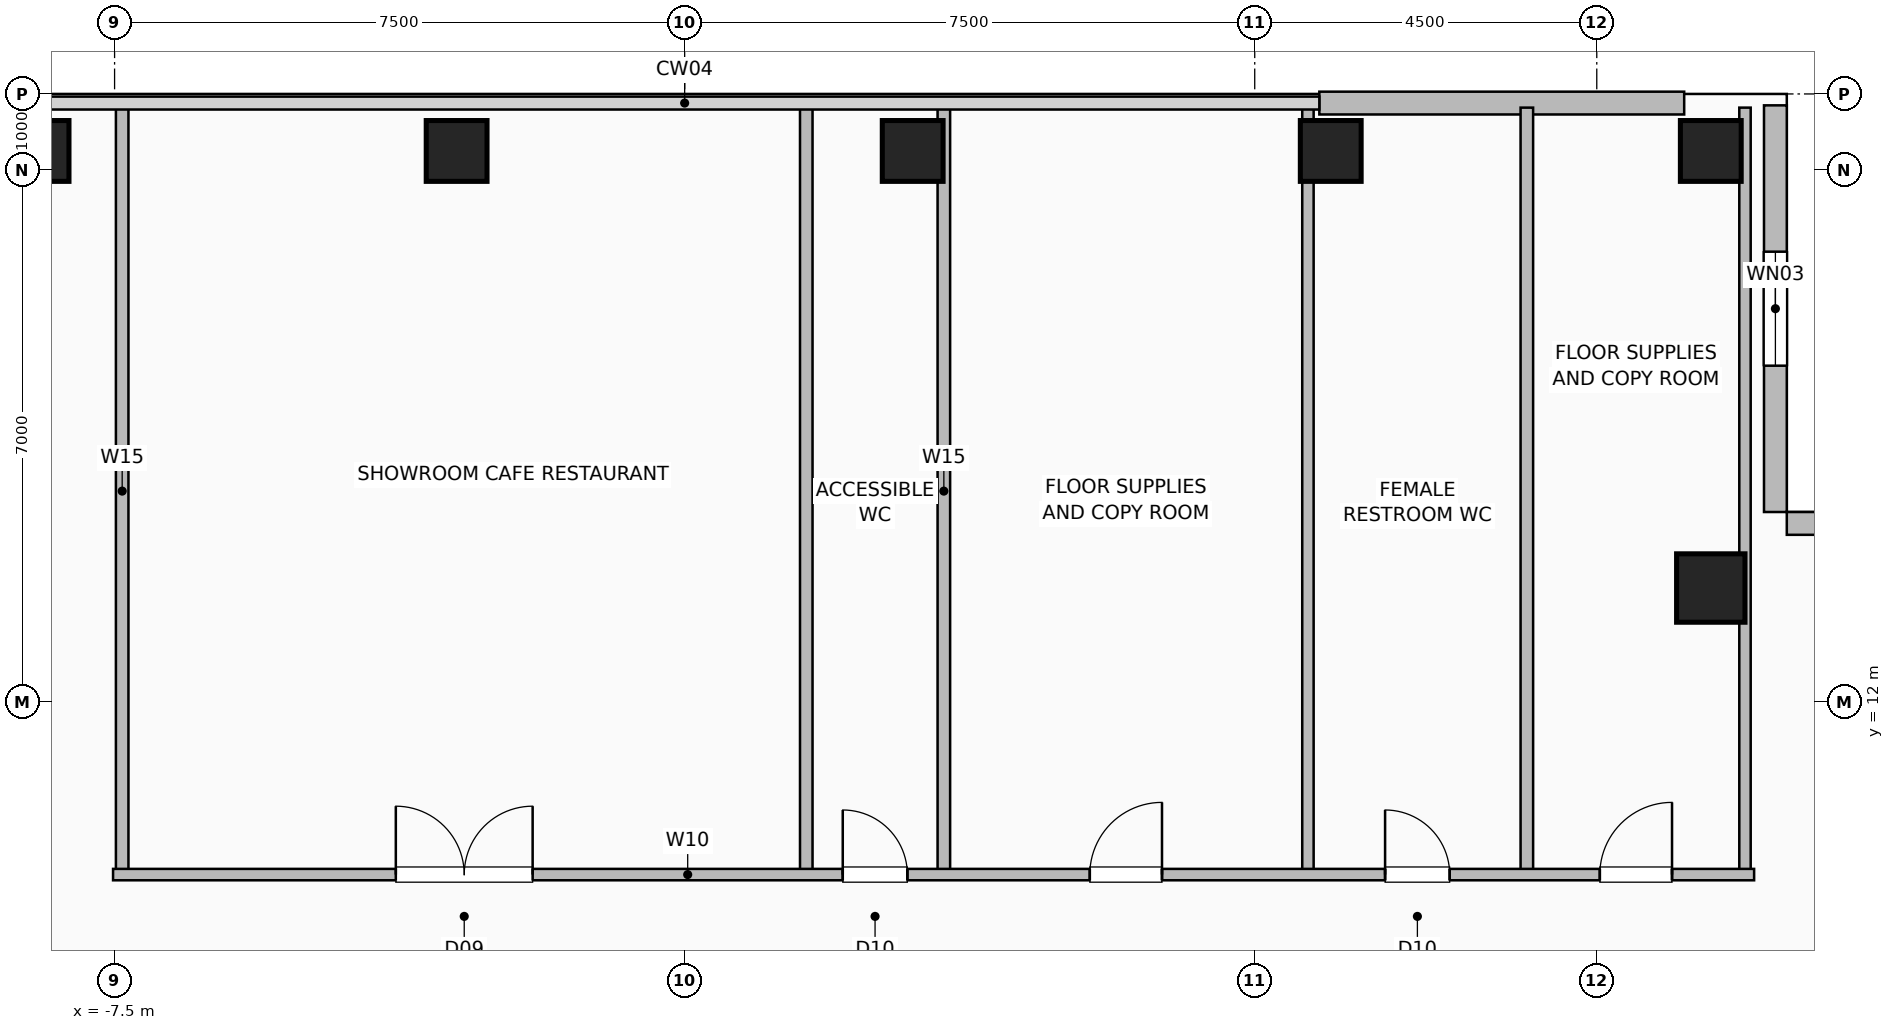
"""IFC4 building model, lengths in metres.
Left out: names, types, materials, properties, quantities, classifications, styles, units other than length and angle.
Written with IfcOpenShell. Run it as: python <this file> out.ifc"""

import sys

from ifc_helpers import new_model, si_unit, direction, frame, frame_2d, origin, origin_2d, place, context, subcontext, project, spatial, rectangle, hollow_rectangle, extrude, element, fill, save


model = new_model("IFC4")
c1 = context("Model", 3, precision=1e-05, world=origin(), true_north=direction((0.0, 1.0)))
c2 = subcontext(c1, "Body", "Model", "MODEL_VIEW")
j1 = project(units=[si_unit("LENGTHUNIT", "METRE"), si_unit("PLANEANGLEUNIT", "RADIAN")], contexts=[c1])
p1 = place(None, origin())
s1 = spatial("IfcSite", under=j1, at=p1, CompositionType="ELEMENT")
p2 = place(p1, origin())
s2 = spatial("IfcBuilding", under=s1, at=p2, CompositionType="ELEMENT")
p3 = place(p2, frame((0.0, 0.0, 223.8)))
s3 = spatial("IfcBuildingStorey", under=s2, at=p3, CompositionType="ELEMENT", Elevation=223.8)
for number, where, z_axis, x_axis in (
    (1, (-8.5, 19.25, 0.0), (0.0, 0.0, 1.0), (1.0, 0.0, 0.0)),
    (2, (-3.0, 19.25, 0.0), (0.0, 0.0, 1.0), (1.0, 0.0, 0.0)),
    (3, (3.0, 19.25, 0.0), (0.0, 0.0, 1.0), (1.0, 0.0, 0.0)),
    (4, (8.5, 19.25, 0.0), (0.0, 0.0, 1.0), (1.0, 0.0, 0.0)),
    (5, (13.5, 19.25, 0.0), (0.0, 0.0, 1.0), (1.0, 0.0, 0.0)),
):
    element("IfcColumn", number, at=place(p3, frame(where, z_axis=z_axis, x_axis=x_axis)), inside=s3, PredefinedType="COLUMN", context=c2, shape_type="SweptSolid", body=[
        extrude(hollow_rectangle(XDim=0.8, YDim=0.8, WallThickness=0.04, at=origin_2d()), origin(), (0.0, 0.0, 1.0), 3.6),
    ])
p4 = place(p3, frame((13.5, 13.5, 0.0), z_axis=(0.0, 0.0, 1.0), x_axis=(1.0, 0.0, 0.0)))
e6 = element("IfcColumn", 6, at=p4, inside=s3, PredefinedType="COLUMN", context=c2, shape_type="SweptSolid", body=[
    extrude(hollow_rectangle(XDim=0.9, YDim=0.9, WallThickness=0.045, at=origin_2d()), origin(), (0.0, 0.0, 1.0), 3.6),
])
p5 = place(p3, frame((8.35, 19.88, 0.0), z_axis=(0.0, 0.0, 1.0), x_axis=(1.0, 0.0, 0.0)))
e7 = element("IfcWall", 7, at=p5, inside=s3, PredefinedType="SOLIDWALL", context=c2, shape_type="SweptSolid", body=[
    extrude(rectangle(XDim=4.8, YDim=0.3, at=frame_2d((2.4, 0.0))), origin(), (0.0, 0.0, 1.0), 3.25),
])
p6 = place(p3, frame((14.35, 19.85, 0.0), z_axis=(0.0, 0.0, 1.0), x_axis=(0.0, -1.0, 0.0)))
e8 = element("IfcWall", 8, at=p6, inside=s3, PredefinedType="SOLIDWALL", context=c2, shape_type="SweptSolid", body=[
    extrude(rectangle(XDim=5.35, YDim=0.3, at=frame_2d((2.675, 0.0))), origin(), (0.0, 0.0, 1.0), 3.25),
])
p7 = place(p6, frame((1.925, 0.0, 0.9)))
e9 = element("IfcOpeningElement", 9, at=p7, cuts=e8, PredefinedType="OPENING", context=c2, shape_type="SweptSolid", body=[
    extrude(rectangle(XDim=1.5, YDim=1.8, at=frame_2d((0.75, 0.9))), frame((0.0, 0.16, 0.0), z_axis=(0.0, -1.0, 0.0), x_axis=(1.0, 0.0, 0.0)), (0.0, 0.0, 1.0), 0.32),
])
p8 = place(p3, frame((19.85, 14.35, 0.0), z_axis=(0.0, 0.0, 1.0), x_axis=(-1.0, 0.0, 0.0)))
e10 = element("IfcWall", 10, at=p8, inside=s3, PredefinedType="SOLIDWALL", context=c2, shape_type="SweptSolid", body=[
    extrude(rectangle(XDim=5.35, YDim=0.3, at=frame_2d((2.675, 0.0))), origin(), (0.0, 0.0, 1.0), 3.25),
])
for number, where, z_axis, x_axis in (
    (11, (3.41, 9.73, 0.0), (0.0, 0.0, 1.0), (0.0, 1.0, 0.0)),
    (12, (11.08, 9.73, 0.0), (0.0, 0.0, 1.0), (0.0, 1.0, 0.0)),
    (13, (-7.4, 9.73, 0.0), (0.0, 0.0, 1.0), (0.0, 1.0, 0.0)),
    (14, (1.6, 9.73, 0.0), (0.0, 0.0, 1.0), (0.0, 1.0, 0.0)),
):
    element("IfcWall", number, at=place(p3, frame(where, z_axis=z_axis, x_axis=x_axis)), inside=s3, PredefinedType="PLUMBINGWALL", context=c2, shape_type="SweptSolid", body=[
        extrude(rectangle(XDim=10.09, YDim=0.165, at=frame_2d((5.045, 0.0))), origin(), (0.0, 0.0, 1.0), 3.25),
    ])
for number, where, z_axis, x_axis in (
    (15, (8.2, 9.73, 0.0), (0.0, 0.0, 1.0), (0.0, 1.0, 0.0)),
    (16, (13.95, 9.73, 0.0), (0.0, 0.0, 1.0), (0.0, 1.0, 0.0)),
):
    element("IfcWall", number, at=place(p3, frame(where, z_axis=z_axis, x_axis=x_axis)), inside=s3, PredefinedType="PARTITIONING", context=c2, shape_type="SweptSolid", body=[
        extrude(rectangle(XDim=10.09, YDim=0.15, at=frame_2d((5.045, 0.0))), origin(), (0.0, 0.0, 1.0), 3.25),
    ])
p9 = place(p3, frame((-7.52, 9.73, 0.0), z_axis=(0.0, 0.0, 1.0), x_axis=(1.0, 0.0, 0.0)))
e17 = element("IfcWall", 17, at=p9, inside=s3, PredefinedType="PARTITIONING", context=c2, shape_type="SweptSolid", body=[
    extrude(rectangle(XDim=21.59, YDim=0.15, at=frame_2d((10.795, 0.0))), origin(), (0.0, 0.0, 1.0), 3.25),
])
p10 = place(p9, frame((3.72, 0.0, 0.0)))
e18 = element("IfcOpeningElement", 18, at=p10, cuts=e17, PredefinedType="OPENING", context=c2, shape_type="SweptSolid", body=[
    extrude(rectangle(XDim=1.8, YDim=2.08, at=frame_2d((0.9, 1.04))), frame((0.0, 0.085, 0.0), z_axis=(0.0, -1.0, 0.0), x_axis=(1.0, 0.0, 0.0)), (0.0, 0.0, 1.0), 0.17),
])
p11 = place(p9, frame((9.6, 0.0, 0.0)))
e19 = element("IfcOpeningElement", 19, at=p11, cuts=e17, PredefinedType="OPENING", context=c2, shape_type="SweptSolid", body=[
    extrude(rectangle(XDim=0.85, YDim=2.05, at=frame_2d((0.425, 1.025))), frame((0.0, 0.085, 0.0), z_axis=(0.0, -1.0, 0.0), x_axis=(1.0, 0.0, 0.0)), (0.0, 0.0, 1.0), 0.17),
])
p12 = place(p9, frame((12.85, 0.0, 0.0)))
e20 = element("IfcOpeningElement", 20, at=p12, cuts=e17, PredefinedType="OPENING", context=c2, shape_type="SweptSolid", body=[
    extrude(rectangle(XDim=0.95, YDim=2.06, at=frame_2d((0.475, 1.03))), frame((0.0, 0.085, 0.0), z_axis=(0.0, -1.0, 0.0), x_axis=(1.0, 0.0, 0.0)), (0.0, 0.0, 1.0), 0.17),
])
p13 = place(p9, frame((16.735, 0.0, 0.0)))
e21 = element("IfcOpeningElement", 21, at=p13, cuts=e17, PredefinedType="OPENING", context=c2, shape_type="SweptSolid", body=[
    extrude(rectangle(XDim=0.85, YDim=2.05, at=frame_2d((0.425, 1.025))), frame((0.0, 0.085, 0.0), z_axis=(0.0, -1.0, 0.0), x_axis=(1.0, 0.0, 0.0)), (0.0, 0.0, 1.0), 0.17),
])
p14 = place(p9, frame((19.56, 0.0, 0.0)))
e22 = element("IfcOpeningElement", 22, at=p14, cuts=e17, PredefinedType="OPENING", context=c2, shape_type="SweptSolid", body=[
    extrude(rectangle(XDim=0.95, YDim=2.06, at=frame_2d((0.475, 1.03))), frame((0.0, 0.085, 0.0), z_axis=(0.0, -1.0, 0.0), x_axis=(1.0, 0.0, 0.0)), (0.0, 0.0, 1.0), 0.17),
])
p15 = place(p7, origin())
e23 = element("IfcWindow", 23, at=p15, inside=s3, PartitioningType="SINGLE_PANEL", PredefinedType="WINDOW", context=c2, shape_type="SweptSolid", body=[
    extrude(rectangle(XDim=1.5, YDim=1.8, at=frame_2d((0.75, 0.9))), frame((0.0, 0.03, 0.0), z_axis=(0.0, -1.0, 0.0), x_axis=(1.0, 0.0, 0.0)), (0.0, 0.0, 1.0), 0.06),
])
fill(e9, e23)
p16 = place(p10, origin())
e24 = element("IfcDoor", 24, at=p16, inside=s3, OperationType="DOUBLE_DOOR_SINGLE_SWING", PredefinedType="DOOR", context=c2, shape_type="SweptSolid", body=[
    extrude(rectangle(XDim=1.8, YDim=2.08, at=frame_2d((0.9, 1.04))), frame((0.0, 0.025, 0.0), z_axis=(0.0, -1.0, 0.0), x_axis=(1.0, 0.0, 0.0)), (0.0, 0.0, 1.0), 0.05),
])
fill(e18, e24)
p17 = place(p11, origin())
e25 = element("IfcDoor", 25, at=p17, inside=s3, OperationType="SINGLE_SWING_LEFT", PredefinedType="DOOR", context=c2, shape_type="SweptSolid", body=[
    extrude(rectangle(XDim=0.85, YDim=2.05, at=frame_2d((0.425, 1.025))), frame((0.0, 0.025, 0.0), z_axis=(0.0, -1.0, 0.0), x_axis=(1.0, 0.0, 0.0)), (0.0, 0.0, 1.0), 0.05),
])
fill(e19, e25)
p18 = place(p12, origin())
e26 = element("IfcDoor", 26, at=p18, inside=s3, OperationType="SINGLE_SWING_RIGHT", PredefinedType="DOOR", context=c2, shape_type="SweptSolid", body=[
    extrude(rectangle(XDim=0.95, YDim=2.06, at=frame_2d((0.475, 1.03))), frame((0.0, 0.025, 0.0), z_axis=(0.0, -1.0, 0.0), x_axis=(1.0, 0.0, 0.0)), (0.0, 0.0, 1.0), 0.05),
])
fill(e20, e26)
p19 = place(p13, origin())
e27 = element("IfcDoor", 27, at=p19, inside=s3, OperationType="SINGLE_SWING_LEFT", PredefinedType="DOOR", context=c2, shape_type="SweptSolid", body=[
    extrude(rectangle(XDim=0.85, YDim=2.05, at=frame_2d((0.425, 1.025))), frame((0.0, 0.025, 0.0), z_axis=(0.0, -1.0, 0.0), x_axis=(1.0, 0.0, 0.0)), (0.0, 0.0, 1.0), 0.05),
])
fill(e21, e27)
p20 = place(p14, origin())
e28 = element("IfcDoor", 28, at=p20, inside=s3, OperationType="SINGLE_SWING_RIGHT", PredefinedType="DOOR", context=c2, shape_type="SweptSolid", body=[
    extrude(rectangle(XDim=0.95, YDim=2.06, at=frame_2d((0.475, 1.03))), frame((0.0, 0.025, 0.0), z_axis=(0.0, -1.0, 0.0), x_axis=(1.0, 0.0, 0.0)), (0.0, 0.0, 1.0), 0.05),
])
fill(e22, e28)
save(model, sys.argv[1])
